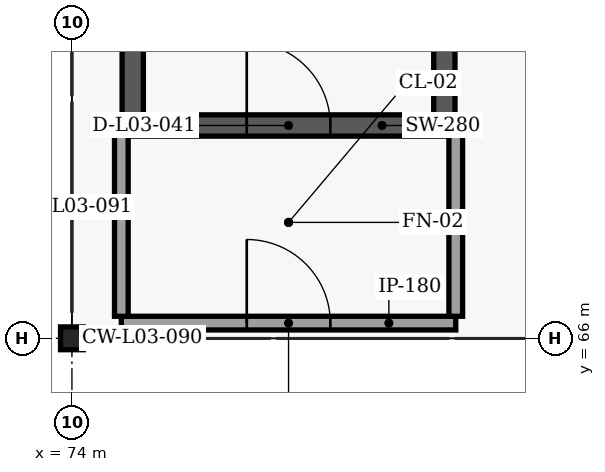
"""IFC4 building model, lengths in metres.
Left out: names, types, materials, properties, quantities, classifications, styles, units other than length and angle.
Written with IfcOpenShell. Run it as: python <this file> out.ifc"""

import sys

from ifc_helpers import new_model, si_unit, direction, frame, frame_2d, origin, origin_2d, place, context, subcontext, project, spatial, rectangle, hollow_rectangle, extrude, element, fill, save


model = new_model("IFC4")
c1 = context("Model", 3, precision=1e-05, world=origin(), true_north=direction((0.0, 1.0)))
c2 = subcontext(c1, "Body", "Model", "MODEL_VIEW")
j1 = project(units=[si_unit("LENGTHUNIT", "METRE"), si_unit("PLANEANGLEUNIT", "RADIAN")], contexts=[c1])
p1 = place(None, origin())
s1 = spatial("IfcSite", under=j1, at=p1, CompositionType="ELEMENT")
p2 = place(p1, origin())
s2 = spatial("IfcBuilding", under=s1, at=p2, CompositionType="ELEMENT")
p3 = place(p2, frame((0.0, 0.0, 10.2)))
s3 = spatial("IfcBuildingStorey", under=s2, at=p3, CompositionType="ELEMENT", Elevation=10.2)
p4 = place(p3, frame((74.0, 66.0, 0.0), z_axis=(0.0, 0.0, 1.0), x_axis=(1.0, 0.0, 0.0)))
e1 = element("IfcColumn", 1, at=p4, inside=s3, PredefinedType="COLUMN", context=c2, shape_type="SweptSolid", body=[
    extrude(hollow_rectangle(XDim=0.3, YDim=0.3, WallThickness=0.012, InnerFilletRadius=0.012, OuterFilletRadius=0.025, at=origin_2d()), origin(), (0.0, 0.0, 1.0), 3.98),
])
p5 = place(p3, frame((74.8, 68.8, 0.0), z_axis=(0.0, 0.0, 1.0), x_axis=(1.0, 0.0, 0.0)))
e2 = element("IfcWall", 2, at=p5, inside=s3, PredefinedType="SHEAR", context=c2, shape_type="SweptSolid", body=[
    extrude(rectangle(XDim=4.1, YDim=0.28, at=frame_2d((2.05, 0.0))), origin(), (0.0, 0.0, 1.0), 5.1),
])
p6 = place(p5, frame((1.5, 0.0, 0.0)))
e3 = element("IfcOpeningElement", 3, at=p6, cuts=e2, PredefinedType="OPENING", context=c2, shape_type="SweptSolid", body=[
    extrude(rectangle(XDim=1.1, YDim=2.2, at=frame_2d((0.55, 1.1))), frame((0.0, 0.15, 0.0), z_axis=(0.0, -1.0, 0.0), x_axis=(1.0, 0.0, 0.0)), (0.0, 0.0, 1.0), 0.3),
])
for number, where, z_axis, x_axis in (
    (4, (74.8, 68.94, 0.0), (0.0, 0.0, 1.0), (0.0, 1.0, 0.0)),
    (5, (78.9, 68.94, 0.0), (0.0, 0.0, 1.0), (0.0, 1.0, 0.0)),
):
    element("IfcWall", number, at=place(p3, frame(where, z_axis=z_axis, x_axis=x_axis)), inside=s3, PredefinedType="SHEAR", context=c2, shape_type="SweptSolid", body=[
        extrude(rectangle(XDim=8.72, YDim=0.28, at=frame_2d((4.36, 0.0))), origin(), (0.0, 0.0, 1.0), 5.1),
    ])
p7 = place(p3, frame((74.65, 66.2, 0.0), z_axis=(0.0, 0.0, 1.0), x_axis=(1.0, 0.0, 0.0)))
e6 = element("IfcWall", 6, at=p7, inside=s3, PredefinedType="SOLIDWALL", context=c2, shape_type="SweptSolid", body=[
    extrude(rectangle(XDim=4.4, YDim=0.18, at=frame_2d((2.2, 0.0))), origin(), (0.0, 0.0, 1.0), 3.657),
])
p8 = place(p7, frame((1.65, 0.0, 0.0)))
e7 = element("IfcOpeningElement", 7, at=p8, cuts=e6, PredefinedType="OPENING", context=c2, shape_type="SweptSolid", body=[
    extrude(rectangle(XDim=1.1, YDim=2.2, at=frame_2d((0.55, 1.1))), frame((0.0, 0.1, 0.0), z_axis=(0.0, -1.0, 0.0), x_axis=(1.0, 0.0, 0.0)), (0.0, 0.0, 1.0), 0.2),
])
for number, where, z_axis, x_axis in (
    (8, (74.65, 66.29, 0.0), (0.0, 0.0, 1.0), (0.0, 1.0, 0.0)),
    (9, (79.05, 66.29, 0.0), (0.0, 0.0, 1.0), (0.0, 1.0, 0.0)),
):
    element("IfcWall", number, at=place(p3, frame(where, z_axis=z_axis, x_axis=x_axis)), inside=s3, PredefinedType="SOLIDWALL", context=c2, shape_type="SweptSolid", body=[
        extrude(rectangle(XDim=2.51, YDim=0.18, at=frame_2d((1.255, 0.0))), origin(), (0.0, 0.0, 1.0), 3.9),
    ])
p9 = place(p6, origin())
e10 = element("IfcDoor", 10, at=p9, inside=s3, OperationType="SINGLE_SWING_LEFT", PredefinedType="DOOR", context=c2, shape_type="SweptSolid", body=[
    extrude(rectangle(XDim=1.1, YDim=2.2, at=frame_2d((0.55, 1.1))), frame((0.0, 0.025, 0.0), z_axis=(0.0, -1.0, 0.0), x_axis=(1.0, 0.0, 0.0)), (0.0, 0.0, 1.0), 0.05),
])
fill(e3, e10)
p10 = place(p8, origin())
e11 = element("IfcDoor", 11, at=p10, inside=s3, OperationType="SINGLE_SWING_LEFT", PredefinedType="DOOR", context=c2, shape_type="SweptSolid", body=[
    extrude(rectangle(XDim=1.1, YDim=2.2, at=frame_2d((0.55, 1.1))), frame((0.0, 0.025, 0.0), z_axis=(0.0, -1.0, 0.0), x_axis=(1.0, 0.0, 0.0)), (0.0, 0.0, 1.0), 0.05),
])
fill(e7, e11)
save(model, sys.argv[1])
